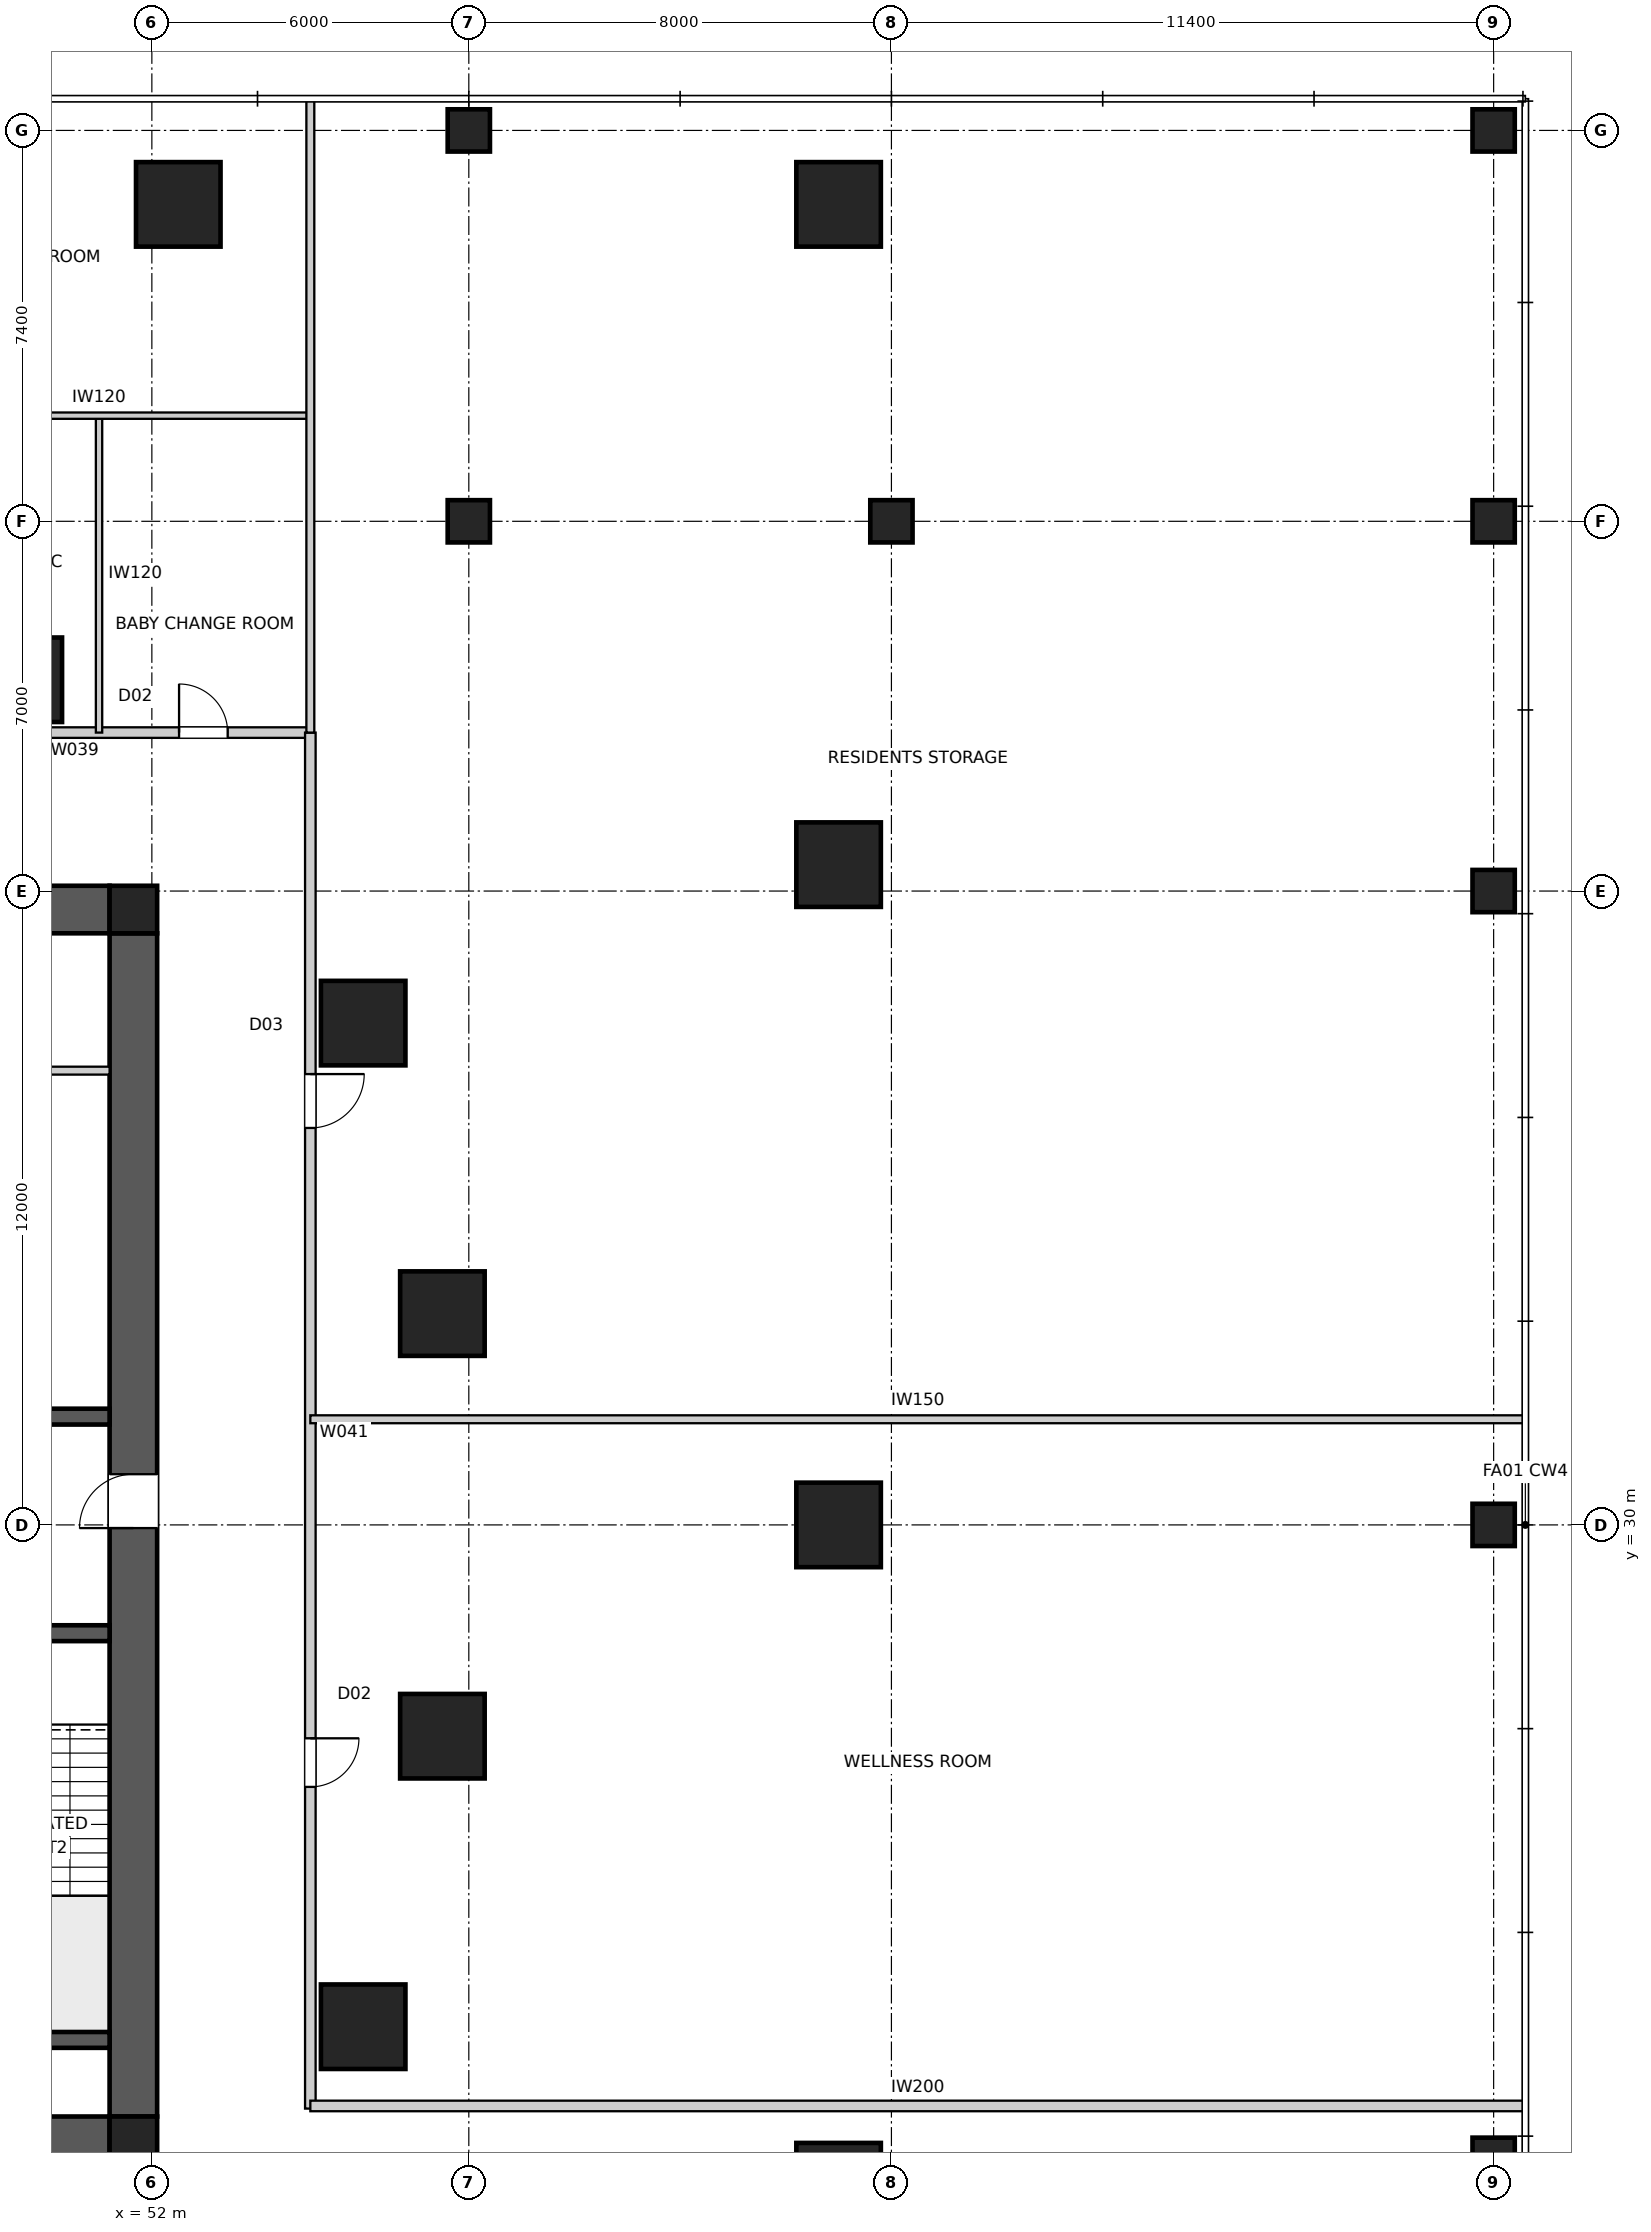
"""IFC4 building model, lengths in metres.
Left out: names, types, materials, properties, quantities, classifications, styles, units other than length and angle.
Written with IfcOpenShell. Run it as: python <this file> out.ifc"""

import sys

from ifc_helpers import new_model, si_unit, direction, frame, frame_2d, origin, origin_2d, place, context, subcontext, project, spatial, polyline, rectangle, outline, extrude, element, fill, save


model = new_model("IFC4")
c1 = context("Model", 3, precision=1e-05, world=origin(), true_north=direction((0.0, 1.0)))
c2 = subcontext(c1, "Body", "Model", "MODEL_VIEW")
j1 = project(units=[si_unit("LENGTHUNIT", "METRE"), si_unit("PLANEANGLEUNIT", "RADIAN")], contexts=[c1])
p1 = place(None, origin())
s1 = spatial("IfcSite", under=j1, at=p1, CompositionType="ELEMENT")
p2 = place(p1, origin())
s2 = spatial("IfcBuilding", under=s1, at=p2, CompositionType="ELEMENT")
p3 = place(p2, frame((0.0, 0.0, 6.0)))
s3 = spatial("IfcBuildingStorey", under=s2, at=p3, CompositionType="ELEMENT", Elevation=6.0)
for number, where, z_axis, x_axis in (
    (1, (28.8, 41.65, 0.0), (0.0, 0.0, 1.0), (1.0, 0.0, 0.0)),
    (2, (51.2, 18.35, 0.0), (0.0, 0.0, 1.0), (-1.0, 0.0, 0.0)),
):
    element("IfcWall", number, at=place(p3, frame(where, z_axis=z_axis, x_axis=x_axis)), inside=s3, PredefinedType="SHEAR", context=c2, shape_type="SweptSolid", body=[
        extrude(outline(polyline([(0.0, -0.45), (22.4, -0.45), (22.4, -0.025), (22.85, -0.025), (22.85, 0.025), (22.4, 0.025), (22.4, 0.45), (0.0, 0.45), (0.0, 0.025), (-0.45, 0.025), (-0.45, -0.025), (0.0, -0.025), (0.0, -0.45)])), origin(), (0.0, 0.0, 1.0), 4.5),
    ])
p4 = place(p3, frame((51.65, 18.8, 0.0), z_axis=(0.0, 0.0, 1.0), x_axis=(0.0, 1.0, 0.0)))
e3 = element("IfcWall", 3, at=p4, inside=s3, PredefinedType="SHEAR", context=c2, shape_type="SweptSolid", body=[
    extrude(outline(polyline([(0.0, -0.45), (22.4, -0.45), (22.4, -0.025), (22.85, -0.025), (22.85, 0.025), (22.4, 0.025), (22.4, 0.45), (0.0, 0.45), (0.0, 0.025), (-0.45, 0.025), (-0.45, -0.025), (0.0, -0.025), (0.0, -0.45)])), origin(), (0.0, 0.0, 1.0), 4.5),
])
p5 = place(p4, frame((11.14, 0.0, 0.0)))
e4 = element("IfcOpeningElement", 4, at=p5, cuts=e3, PredefinedType="OPENING", context=c2, shape_type="SweptSolid", body=[
    extrude(rectangle(XDim=1.02, YDim=2.4, at=frame_2d((0.51, 1.2))), frame((0.0, 0.46, 0.0), z_axis=(0.0, -1.0, 0.0), x_axis=(1.0, 0.0, 0.0)), (0.0, 0.0, 1.0), 0.92),
])
p6 = place(p3, frame((28.8, 32.05, 0.0), z_axis=(0.0, 0.0, 1.0), x_axis=(1.0, 0.0, 0.0)))
e5 = element("IfcWall", 5, at=p6, inside=s3, PredefinedType="SHEAR", context=c2, shape_type="SweptSolid", body=[
    extrude(rectangle(XDim=22.4, YDim=0.3, at=frame_2d((11.2, 0.0))), origin(), (0.0, 0.0, 1.0), 4.5),
])
p7 = place(p6, frame((19.04, 0.0, 0.0)))
e6 = element("IfcOpeningElement", 6, at=p7, cuts=e5, PredefinedType="OPENING", context=c2, shape_type="SweptSolid", body=[
    extrude(rectangle(XDim=0.92, YDim=2.1, at=frame_2d((0.46, 1.05))), frame((0.0, 0.16, 0.0), z_axis=(0.0, -1.0, 0.0), x_axis=(1.0, 0.0, 0.0)), (0.0, 0.0, 1.0), 0.32),
])
p8 = place(p6, frame((1.265, 0.0, 0.0)))
e7 = element("IfcOpeningElement", 7, at=p8, cuts=e5, PredefinedType="OPENING", context=c2, shape_type="SweptSolid", body=[
    extrude(rectangle(XDim=1.02, YDim=2.1, at=frame_2d((0.51, 1.05))), frame((0.0, 0.16, 0.0), z_axis=(0.0, -1.0, 0.0), x_axis=(1.0, 0.0, 0.0)), (0.0, 0.0, 1.0), 0.32),
])
p9 = place(p6, frame((4.015, 0.0, 0.0)))
e8 = element("IfcOpeningElement", 8, at=p9, cuts=e5, PredefinedType="OPENING", context=c2, shape_type="SweptSolid", body=[
    extrude(rectangle(XDim=0.92, YDim=2.1, at=frame_2d((0.46, 1.05))), frame((0.0, 0.16, 0.0), z_axis=(0.0, -1.0, 0.0), x_axis=(1.0, 0.0, 0.0)), (0.0, 0.0, 1.0), 0.32),
])
p10 = place(p6, frame((6.45, 0.0, 0.0)))
e9 = element("IfcOpeningElement", 9, at=p10, cuts=e5, PredefinedType="OPENING", context=c2, shape_type="SweptSolid", body=[
    extrude(rectangle(XDim=1.1, YDim=2.1, at=frame_2d((0.55, 1.05))), frame((0.0, 0.16, 0.0), z_axis=(0.0, -1.0, 0.0), x_axis=(1.0, 0.0, 0.0)), (0.0, 0.0, 1.0), 0.32),
])
p11 = place(p6, frame((9.25, 0.0, 0.0)))
e10 = element("IfcOpeningElement", 10, at=p11, cuts=e5, PredefinedType="OPENING", context=c2, shape_type="SweptSolid", body=[
    extrude(rectangle(XDim=1.1, YDim=2.1, at=frame_2d((0.55, 1.05))), frame((0.0, 0.16, 0.0), z_axis=(0.0, -1.0, 0.0), x_axis=(1.0, 0.0, 0.0)), (0.0, 0.0, 1.0), 0.32),
])
p12 = place(p6, frame((14.85, 0.0, 0.0)))
e11 = element("IfcOpeningElement", 11, at=p12, cuts=e5, PredefinedType="OPENING", context=c2, shape_type="SweptSolid", body=[
    extrude(rectangle(XDim=1.1, YDim=2.1, at=frame_2d((0.55, 1.05))), frame((0.0, 0.16, 0.0), z_axis=(0.0, -1.0, 0.0), x_axis=(1.0, 0.0, 0.0)), (0.0, 0.0, 1.0), 0.32),
])
p13 = place(p3, frame((51.2, 27.95, 0.0), z_axis=(0.0, 0.0, 1.0), x_axis=(-1.0, 0.0, 0.0)))
e12 = element("IfcWall", 12, at=p13, inside=s3, PredefinedType="SHEAR", context=c2, shape_type="SweptSolid", body=[
    extrude(rectangle(XDim=22.4, YDim=0.3, at=frame_2d((11.2, 0.0))), origin(), (0.0, 0.0, 1.0), 4.5),
])
p14 = place(p13, frame((19.04, 0.0, 0.0)))
e13 = element("IfcOpeningElement", 13, at=p14, cuts=e12, PredefinedType="OPENING", context=c2, shape_type="SweptSolid", body=[
    extrude(rectangle(XDim=0.92, YDim=2.1, at=frame_2d((0.46, 1.05))), frame((0.0, 0.16, 0.0), z_axis=(0.0, -1.0, 0.0), x_axis=(1.0, 0.0, 0.0)), (0.0, 0.0, 1.0), 0.32),
])
p15 = place(p13, frame((1.265, 0.0, 0.0)))
e14 = element("IfcOpeningElement", 14, at=p15, cuts=e12, PredefinedType="OPENING", context=c2, shape_type="SweptSolid", body=[
    extrude(rectangle(XDim=1.02, YDim=2.1, at=frame_2d((0.51, 1.05))), frame((0.0, 0.16, 0.0), z_axis=(0.0, -1.0, 0.0), x_axis=(1.0, 0.0, 0.0)), (0.0, 0.0, 1.0), 0.32),
])
p16 = place(p13, frame((4.015, 0.0, 0.0)))
e15 = element("IfcOpeningElement", 15, at=p16, cuts=e12, PredefinedType="OPENING", context=c2, shape_type="SweptSolid", body=[
    extrude(rectangle(XDim=0.92, YDim=2.1, at=frame_2d((0.46, 1.05))), frame((0.0, 0.16, 0.0), z_axis=(0.0, -1.0, 0.0), x_axis=(1.0, 0.0, 0.0)), (0.0, 0.0, 1.0), 0.32),
])
p17 = place(p13, frame((14.85, 0.0, 0.0)))
e16 = element("IfcOpeningElement", 16, at=p17, cuts=e12, PredefinedType="OPENING", context=c2, shape_type="SweptSolid", body=[
    extrude(rectangle(XDim=1.1, YDim=2.1, at=frame_2d((0.55, 1.05))), frame((0.0, 0.16, 0.0), z_axis=(0.0, -1.0, 0.0), x_axis=(1.0, 0.0, 0.0)), (0.0, 0.0, 1.0), 0.32),
])
p18 = place(p3, frame((51.2, 20.25, 0.0), z_axis=(0.0, 0.0, 1.0), x_axis=(-1.0, 0.0, 0.0)))
e17 = element("IfcWall", 17, at=p18, inside=s3, PredefinedType="SHEAR", context=c2, shape_type="SweptSolid", body=[
    extrude(rectangle(XDim=3.5, YDim=0.3, at=frame_2d((1.75, 0.0))), origin(), (0.0, 0.0, 1.0), 4.5),
])
for number, where, z_axis, x_axis in (
    (18, (51.65, 18.35, 0.0), (0.0, 0.0, 1.0), (1.0, 0.0, 0.0)),
    (19, (51.65, 41.65, 0.0), (0.0, 0.0, 1.0), (1.0, 0.0, 0.0)),
):
    element("IfcColumn", number, at=place(p3, frame(where, z_axis=z_axis, x_axis=x_axis)), inside=s3, PredefinedType="COLUMN", context=c2, shape_type="SweptSolid", body=[
        extrude(rectangle(XDim=0.9, YDim=0.9, at=origin_2d()), origin(), (0.0, 0.0, 1.0), 4.5),
    ])
for number, where, z_axis, x_axis in (
    (20, (65.0, 17.5, 0.0), (0.0, 0.0, 1.0), (1.0, 0.0, 0.0)),
    (21, (65.0, 30.0, 0.0), (0.0, 0.0, 1.0), (1.0, 0.0, 0.0)),
    (22, (65.0, 42.5, 0.0), (0.0, 0.0, 1.0), (1.0, 0.0, 0.0)),
    (23, (65.0, 55.0, 0.0), (0.0, 0.0, 1.0), (1.0, 0.0, 0.0)),
    (24, (52.5, 55.0, 0.0), (0.0, 0.0, 1.0), (1.0, 0.0, 0.0)),
):
    element("IfcColumn", number, at=place(p3, frame(where, z_axis=z_axis, x_axis=x_axis)), inside=s3, PredefinedType="COLUMN", context=c2, shape_type="SweptSolid", body=[
        extrude(rectangle(XDim=1.6, YDim=1.6, at=origin_2d()), origin(), (0.0, 0.0, 1.0), 4.5),
    ])
for number, where, z_axis, x_axis in (
    (25, (58.0, 49.0, 0.0), (0.0, 0.0, 1.0), (1.0, 0.0, 0.0)),
    (26, (58.0, 56.4, 0.0), (0.0, 0.0, 1.0), (1.0, 0.0, 0.0)),
    (27, (66.0, 49.0, 0.0), (0.0, 0.0, 1.0), (1.0, 0.0, 0.0)),
    (28, (77.4, 18.0, 0.0), (0.0, 0.0, 1.0), (1.0, 0.0, 0.0)),
    (29, (77.4, 30.0, 0.0), (0.0, 0.0, 1.0), (1.0, 0.0, 0.0)),
    (30, (77.4, 42.0, 0.0), (0.0, 0.0, 1.0), (1.0, 0.0, 0.0)),
    (31, (77.4, 49.0, 0.0), (0.0, 0.0, 1.0), (1.0, 0.0, 0.0)),
    (32, (77.4, 56.4, 0.0), (0.0, 0.0, 1.0), (1.0, 0.0, 0.0)),
):
    element("IfcColumn", number, at=place(p3, frame(where, z_axis=z_axis, x_axis=x_axis)), inside=s3, PredefinedType="COLUMN", context=c2, shape_type="SweptSolid", body=[
        extrude(rectangle(XDim=0.8, YDim=0.8, at=origin_2d()), origin(), (0.0, 0.0, 1.0), 4.5),
    ])
for number, where, z_axis, x_axis in (
    (33, (57.5, 26.0, 0.0), (0.0, 0.0, 1.0), (1.0, 0.0, 0.0)),
    (34, (57.5, 34.0, 0.0), (0.0, 0.0, 1.0), (1.0, 0.0, 0.0)),
    (35, (56.0, 39.5, 0.0), (0.0, 0.0, 1.0), (1.0, 0.0, 0.0)),
    (36, (49.5, 46.0, 0.0), (0.0, 0.0, 1.0), (1.0, 0.0, 0.0)),
    (37, (56.0, 20.5, 0.0), (0.0, 0.0, 1.0), (1.0, 0.0, 0.0)),
):
    element("IfcColumn", number, at=place(p3, frame(where, z_axis=z_axis, x_axis=x_axis)), inside=s3, PredefinedType="COLUMN", context=c2, shape_type="SweptSolid", body=[
        extrude(rectangle(XDim=1.6, YDim=1.6, at=origin_2d()), origin(), (0.0, 0.0, 1.0), 4.5),
    ])
p19 = place(p3, frame((43.0, 38.6, 0.0), z_axis=(0.0, 0.0, 1.0), x_axis=(1.0, 0.0, 0.0)))
e38 = element("IfcWall", 38, at=p19, inside=s3, PredefinedType="SOLIDWALL", context=c2, shape_type="SweptSolid", body=[
    extrude(rectangle(XDim=8.2, YDim=0.15, at=frame_2d((4.1, 0.0))), origin(), (0.0, 0.0, 1.0), 4.15),
])
p20 = place(p19, frame((3.64, 0.0, 0.0)))
e39 = element("IfcOpeningElement", 39, at=p20, cuts=e38, PredefinedType="OPENING", context=c2, shape_type="SweptSolid", body=[
    extrude(rectangle(XDim=0.92, YDim=2.1, at=frame_2d((0.46, 1.05))), frame((0.0, 0.085, 0.0), z_axis=(0.0, -1.0, 0.0), x_axis=(1.0, 0.0, 0.0)), (0.0, 0.0, 1.0), 0.17),
])
p21 = place(p3, frame((46.95, 45.0, 0.0), z_axis=(0.0, 0.0, 1.0), x_axis=(1.0, 0.0, 0.0)))
e40 = element("IfcWall", 40, at=p21, inside=s3, PredefinedType="PARTITIONING", context=c2, shape_type="SweptSolid", body=[
    extrude(rectangle(XDim=8.05, YDim=0.2, at=frame_2d((4.025, 0.0))), origin(), (0.0, 0.0, 1.0), 4.15),
])
p22 = place(p21, frame((0.69, 0.0, 0.0)))
e41 = element("IfcOpeningElement", 41, at=p22, cuts=e40, PredefinedType="OPENING", context=c2, shape_type="SweptSolid", body=[
    extrude(rectangle(XDim=0.92, YDim=2.34, at=frame_2d((0.46, 1.17))), frame((0.0, 0.11, 0.0), z_axis=(0.0, -1.0, 0.0), x_axis=(1.0, 0.0, 0.0)), (0.0, 0.0, 1.0), 0.22),
])
p23 = place(p21, frame((5.565, 0.0, 0.0)))
e42 = element("IfcOpeningElement", 42, at=p23, cuts=e40, PredefinedType="OPENING", context=c2, shape_type="SweptSolid", body=[
    extrude(rectangle(XDim=0.92, YDim=2.34, at=frame_2d((0.46, 1.17))), frame((0.0, 0.11, 0.0), z_axis=(0.0, -1.0, 0.0), x_axis=(1.0, 0.0, 0.0)), (0.0, 0.0, 1.0), 0.22),
])
p24 = place(p3, frame((55.0, 45.0, 0.0), z_axis=(0.0, 0.0, 1.0), x_axis=(0.0, -1.0, 0.0)))
e43 = element("IfcWall", 43, at=p24, inside=s3, PredefinedType="PARTITIONING", context=c2, shape_type="SweptSolid", body=[
    extrude(rectangle(XDim=26.05, YDim=0.2, at=frame_2d((13.025, 0.0))), origin(), (0.0, 0.0, 1.0), 4.15),
])
p25 = place(p24, frame((19.04, 0.0, 0.0)))
e44 = element("IfcOpeningElement", 44, at=p25, cuts=e43, PredefinedType="OPENING", context=c2, shape_type="SweptSolid", body=[
    extrude(rectangle(XDim=0.92, YDim=2.34, at=frame_2d((0.46, 1.17))), frame((0.0, 0.11, 0.0), z_axis=(0.0, -1.0, 0.0), x_axis=(1.0, 0.0, 0.0)), (0.0, 0.0, 1.0), 0.22),
])
p26 = place(p24, frame((6.465, 0.0, 0.0)))
e45 = element("IfcOpeningElement", 45, at=p26, cuts=e43, PredefinedType="OPENING", context=c2, shape_type="SweptSolid", body=[
    extrude(rectangle(XDim=1.02, YDim=2.1, at=frame_2d((0.51, 1.05))), frame((0.0, 0.11, 0.0), z_axis=(0.0, -1.0, 0.0), x_axis=(1.0, 0.0, 0.0)), (0.0, 0.0, 1.0), 0.22),
])
p27 = place(p3, frame((55.0, 19.0, 0.0), z_axis=(0.0, 0.0, 1.0), x_axis=(1.0, 0.0, 0.0)))
e46 = element("IfcWall", 46, at=p27, inside=s3, PredefinedType="PARTITIONING", context=c2, shape_type="SweptSolid", body=[
    extrude(rectangle(XDim=23.0, YDim=0.2, at=frame_2d((11.5, 0.0))), origin(), (0.0, 0.0, 1.0), 4.15),
])
p28 = place(p3, frame((51.0, 51.0, 0.0), z_axis=(0.0, 0.0, 1.0), x_axis=(0.0, -1.0, 0.0)))
e47 = element("IfcWall", 47, at=p28, inside=s3, PredefinedType="PARTITIONING", context=c2, shape_type="SweptSolid", body=[
    extrude(rectangle(XDim=6.0, YDim=0.12, at=frame_2d((3.0, 0.0))), origin(), (0.0, 0.0, 1.0), 4.15),
])
p29 = place(p3, frame((47.0, 51.0, 0.0), z_axis=(0.0, 0.0, 1.0), x_axis=(1.0, 0.0, 0.0)))
e48 = element("IfcWall", 48, at=p29, inside=s3, PredefinedType="PARTITIONING", context=c2, shape_type="SweptSolid", body=[
    extrude(rectangle(XDim=8.0, YDim=0.12, at=frame_2d((4.0, 0.0))), origin(), (0.0, 0.0, 1.0), 4.15),
])
p30 = place(p3, frame((55.0, 57.0, 0.0), z_axis=(0.0, 0.0, 1.0), x_axis=(0.0, -1.0, 0.0)))
e49 = element("IfcWall", 49, at=p30, inside=s3, PredefinedType="SOLIDWALL", context=c2, shape_type="SweptSolid", body=[
    extrude(rectangle(XDim=12.0, YDim=0.15, at=frame_2d((6.0, 0.0))), origin(), (0.0, 0.0, 1.0), 4.15),
])
p31 = place(p3, frame((55.0, 32.0, 0.0), z_axis=(0.0, 0.0, 1.0), x_axis=(1.0, 0.0, 0.0)))
e50 = element("IfcWall", 50, at=p31, inside=s3, PredefinedType="SOLIDWALL", context=c2, shape_type="SweptSolid", body=[
    extrude(rectangle(XDim=23.0, YDim=0.15, at=frame_2d((11.5, 0.0))), origin(), (0.0, 0.0, 1.0), 4.15),
])
p32 = place(p25, origin())
e51 = element("IfcDoor", 51, at=p32, inside=s3, OperationType="SINGLE_SWING_LEFT", PredefinedType="DOOR", context=c2, shape_type="SweptSolid", body=[
    extrude(rectangle(XDim=0.92, YDim=2.34, at=frame_2d((0.46, 1.17))), frame((0.0, 0.025, 0.0), z_axis=(0.0, -1.0, 0.0), x_axis=(1.0, 0.0, 0.0)), (0.0, 0.0, 1.0), 0.05),
])
fill(e44, e51)
p33 = place(p26, origin())
e52 = element("IfcDoor", 52, at=p33, inside=s3, OperationType="SINGLE_SWING_LEFT", PredefinedType="DOOR", context=c2, shape_type="SweptSolid", body=[
    extrude(rectangle(XDim=1.02, YDim=2.1, at=frame_2d((0.51, 1.05))), frame((0.0, 0.025, 0.0), z_axis=(0.0, -1.0, 0.0), x_axis=(1.0, 0.0, 0.0)), (0.0, 0.0, 1.0), 0.05),
])
fill(e45, e52)
p34 = place(p23, origin())
e53 = element("IfcDoor", 53, at=p34, inside=s3, OperationType="SINGLE_SWING_LEFT", PredefinedType="DOOR", context=c2, shape_type="SweptSolid", body=[
    extrude(rectangle(XDim=0.92, YDim=2.34, at=frame_2d((0.46, 1.17))), frame((0.0, 0.025, 0.0), z_axis=(0.0, -1.0, 0.0), x_axis=(1.0, 0.0, 0.0)), (0.0, 0.0, 1.0), 0.05),
])
fill(e42, e53)
p35 = place(p5, origin())
e54 = element("IfcDoor", 54, at=p35, inside=s3, OperationType="SINGLE_SWING_LEFT", PredefinedType="DOOR", context=c2, shape_type="SweptSolid", body=[
    extrude(rectangle(XDim=1.02, YDim=2.4, at=frame_2d((0.51, 1.2))), frame((0.0, 0.025, 0.0), z_axis=(0.0, -1.0, 0.0), x_axis=(1.0, 0.0, 0.0)), (0.0, 0.0, 1.0), 0.05),
])
fill(e4, e54)
save(model, sys.argv[1])
